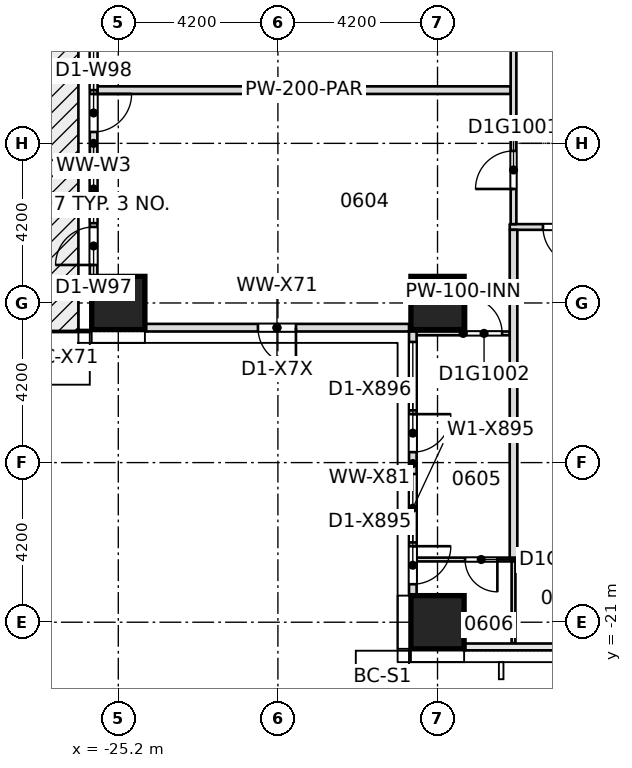
"""IFC4 building model, lengths in metres.
Left out: names, types, materials, properties, quantities, classifications, styles, units other than length and angle.
Written with IfcOpenShell. Run it as: python <this file> out.ifc"""

import sys

from ifc_helpers import new_model, si_unit, direction, frame, frame_2d, origin, origin_2d, place, context, subcontext, project, spatial, rectangle, extrude, element, fill, save


model = new_model("IFC4")
c1 = context("Model", 3, precision=1e-05, world=origin(), true_north=direction((0.0, 1.0)))
c2 = subcontext(c1, "Body", "Model", "MODEL_VIEW")
j1 = project(units=[si_unit("LENGTHUNIT", "METRE"), si_unit("PLANEANGLEUNIT", "RADIAN")], contexts=[c1])
p1 = place(None, origin())
s1 = spatial("IfcSite", under=j1, at=p1, CompositionType="ELEMENT")
p2 = place(p1, origin())
s2 = spatial("IfcBuilding", under=s1, at=p2, CompositionType="ELEMENT")
p3 = place(p2, frame((0.0, 0.0, 34.5)))
s3 = spatial("IfcBuildingStorey", under=s2, at=p3, CompositionType="ELEMENT", Elevation=34.5)
for number, where, z_axis, x_axis in (
    (1, (-16.8, -21.0, -0.32), (0.0, 0.0, 1.0), (1.0, 0.0, 0.0)),
    (2, (-25.2, -12.6, -0.32), (0.0, 0.0, 1.0), (1.0, 0.0, 0.0)),
    (3, (-16.8, -12.6, -0.32), (0.0, 0.0, 1.0), (1.0, 0.0, 0.0)),
):
    element("IfcColumn", number, at=place(p3, frame(where, z_axis=z_axis, x_axis=x_axis)), inside=s3, PredefinedType="COLUMN", context=c2, shape_type="SweptSolid", body=[
        extrude(rectangle(XDim=1.4, YDim=1.4, at=origin_2d()), origin(), (0.0, 0.0, 1.0), 3.45),
    ])
p4 = place(p3, frame((-17.35, -19.35, 0.0), z_axis=(0.0, 0.0, 1.0), x_axis=(1.0, 0.0, 0.0)))
e4 = element("IfcWall", 4, at=p4, inside=s3, PredefinedType="PARTITIONING", context=c2, shape_type="SweptSolid", body=[
    extrude(rectangle(XDim=2.65, YDim=0.1, at=frame_2d((1.325, 0.0))), origin(), (0.0, 0.0, 1.0), 3.13),
])
p5 = place(p4, frame((1.275, 0.0, 0.0)))
e5 = element("IfcOpeningElement", 5, at=p5, cuts=e4, PredefinedType="OPENING", context=c2, shape_type="SweptSolid", body=[
    extrude(rectangle(XDim=0.85, YDim=2.1, at=frame_2d((0.425, 1.05))), frame((0.0, 0.06, 0.0), z_axis=(0.0, -1.0, 0.0), x_axis=(1.0, 0.0, 0.0)), (0.0, 0.0, 1.0), 0.12),
])
p6 = place(p3, frame((-17.35, -13.4, 0.0), z_axis=(0.0, 0.0, 1.0), x_axis=(1.0, 0.0, 0.0)))
e6 = element("IfcWall", 6, at=p6, inside=s3, PredefinedType="PARTITIONING", context=c2, shape_type="SweptSolid", body=[
    extrude(rectangle(XDim=2.45, YDim=0.1, at=frame_2d((1.225, 0.0))), origin(), (0.0, 0.0, 1.0), 3.13),
])
p7 = place(p6, frame((1.3, 0.0, 0.0)))
e7 = element("IfcOpeningElement", 7, at=p7, cuts=e6, PredefinedType="OPENING", context=c2, shape_type="SweptSolid", body=[
    extrude(rectangle(XDim=0.95, YDim=2.1, at=frame_2d((0.475, 1.05))), frame((0.0, 0.06, 0.0), z_axis=(0.0, -1.0, 0.0), x_axis=(1.0, 0.0, 0.0)), (0.0, 0.0, 1.0), 0.12),
])
p8 = place(p3, frame((-14.9, -10.6, 0.0), z_axis=(0.0, 0.0, 1.0), x_axis=(1.0, 0.0, 0.0)))
e8 = element("IfcWall", 8, at=p8, inside=s3, PredefinedType="PARTITIONING", context=c2, shape_type="SweptSolid", body=[
    extrude(rectangle(XDim=29.8, YDim=0.15, at=frame_2d((14.9, 0.0))), origin(), (0.0, 0.0, 1.0), 3.13),
])
p9 = place(p8, frame((9.225, 0.0, 0.0)))
e9 = element("IfcOpeningElement", 9, at=p9, cuts=e8, PredefinedType="OPENING", context=c2, shape_type="SweptSolid", body=[
    extrude(rectangle(XDim=0.95, YDim=2.1, at=frame_2d((0.475, 1.05))), frame((0.0, 0.085, 0.0), z_axis=(0.0, -1.0, 0.0), x_axis=(1.0, 0.0, 0.0)), (0.0, 0.0, 1.0), 0.17),
])
p10 = place(p8, frame((19.625, 0.0, 0.0)))
e10 = element("IfcOpeningElement", 10, at=p10, cuts=e8, PredefinedType="OPENING", context=c2, shape_type="SweptSolid", body=[
    extrude(rectangle(XDim=0.95, YDim=2.1, at=frame_2d((0.475, 1.05))), frame((0.0, 0.085, 0.0), z_axis=(0.0, -1.0, 0.0), x_axis=(1.0, 0.0, 0.0)), (0.0, 0.0, 1.0), 0.17),
])
p11 = place(p8, frame((3.95, 0.0, 0.0)))
e11 = element("IfcOpeningElement", 11, at=p11, cuts=e8, PredefinedType="OPENING", context=c2, shape_type="SweptSolid", body=[
    extrude(rectangle(XDim=1.1, YDim=2.1, at=frame_2d((0.55, 1.05))), frame((0.0, 0.085, 0.0), z_axis=(0.0, -1.0, 0.0), x_axis=(1.0, 0.0, 0.0)), (0.0, 0.0, 1.0), 0.17),
])
p12 = place(p8, frame((15.5, 0.0, 0.0)))
e12 = element("IfcOpeningElement", 12, at=p12, cuts=e8, PredefinedType="OPENING", context=c2, shape_type="SweptSolid", body=[
    extrude(rectangle(XDim=1.1, YDim=2.1, at=frame_2d((0.55, 1.05))), frame((0.0, 0.085, 0.0), z_axis=(0.0, -1.0, 0.0), x_axis=(1.0, 0.0, 0.0)), (0.0, 0.0, 1.0), 0.17),
])
p13 = place(p8, frame((24.75, 0.0, 0.0)))
e13 = element("IfcOpeningElement", 13, at=p13, cuts=e8, PredefinedType="OPENING", context=c2, shape_type="SweptSolid", body=[
    extrude(rectangle(XDim=1.1, YDim=2.1, at=frame_2d((0.55, 1.05))), frame((0.0, 0.085, 0.0), z_axis=(0.0, -1.0, 0.0), x_axis=(1.0, 0.0, 0.0)), (0.0, 0.0, 1.0), 0.17),
])
p14 = place(p8, frame((0.875, 0.0, 0.0)))
e14 = element("IfcOpeningElement", 14, at=p14, cuts=e8, PredefinedType="OPENING", context=c2, shape_type="SweptSolid", body=[
    extrude(rectangle(XDim=1.0, YDim=2.1, at=frame_2d((0.5, 1.05))), frame((0.0, 0.085, 0.0), z_axis=(0.0, -1.0, 0.0), x_axis=(1.0, 0.0, 0.0)), (0.0, 0.0, 1.0), 0.17),
])
p15 = place(p8, frame((27.925, 0.0, 0.0)))
e15 = element("IfcOpeningElement", 15, at=p15, cuts=e8, PredefinedType="OPENING", context=c2, shape_type="SweptSolid", body=[
    extrude(rectangle(XDim=1.0, YDim=2.1, at=frame_2d((0.5, 1.05))), frame((0.0, 0.085, 0.0), z_axis=(0.0, -1.0, 0.0), x_axis=(1.0, 0.0, 0.0)), (0.0, 0.0, 1.0), 0.17),
])
p16 = place(p3, frame((-25.75, -7.0, 0.0), z_axis=(0.0, 0.0, 1.0), x_axis=(1.0, 0.0, 0.0)))
e16 = element("IfcWall", 16, at=p16, inside=s3, PredefinedType="PARTITIONING", context=c2, shape_type="SweptSolid", body=[
    extrude(rectangle(XDim=10.875, YDim=0.2, at=frame_2d((5.438, 0.0))), origin(), (0.0, 0.0, 1.0), 3.13),
])
p17 = place(p3, frame((-14.8, -21.55, 0.0), z_axis=(0.0, 0.0, 1.0), x_axis=(0.0, 1.0, 0.0)))
e17 = element("IfcWall", 17, at=p17, inside=s3, PredefinedType="PARTITIONING", context=c2, shape_type="SweptSolid", body=[
    extrude(rectangle(XDim=2.15, YDim=0.1, at=frame_2d((1.075, 0.0))), origin(), (0.0, 0.0, 1.0), 3.13),
])
p18 = place(p3, frame((-14.8, -19.3, 0.0), z_axis=(0.0, 0.0, 1.0), x_axis=(0.0, 1.0, 0.0)))
e18 = element("IfcWall", 18, at=p18, inside=s3, PredefinedType="PARTITIONING", context=c2, shape_type="SweptSolid", body=[
    extrude(rectangle(XDim=8.625, YDim=0.2, at=frame_2d((4.312, 0.0))), origin(), (0.0, 0.0, 1.0), 3.13),
])
p19 = place(p3, frame((-14.8, -10.525, 0.0), z_axis=(0.0, 0.0, 1.0), x_axis=(0.0, 1.0, 0.0)))
e19 = element("IfcWall", 19, at=p19, inside=s3, PredefinedType="PARTITIONING", context=c2, shape_type="SweptSolid", body=[
    extrude(rectangle(XDim=23.825, YDim=0.15, at=frame_2d((11.913, 0.0))), origin(), (0.0, 0.0, 1.0), 3.13),
])
p20 = place(p19, frame((0.925, 0.0, 0.0)))
e20 = element("IfcOpeningElement", 20, at=p20, cuts=e19, PredefinedType="OPENING", context=c2, shape_type="SweptSolid", body=[
    extrude(rectangle(XDim=1.0, YDim=2.1, at=frame_2d((0.5, 1.05))), frame((0.0, 0.085, 0.0), z_axis=(0.0, -1.0, 0.0), x_axis=(1.0, 0.0, 0.0)), (0.0, 0.0, 1.0), 0.17),
])
p21 = place(p19, frame((16.065, 0.0, 0.0)))
e21 = element("IfcOpeningElement", 21, at=p21, cuts=e19, PredefinedType="OPENING", context=c2, shape_type="SweptSolid", body=[
    extrude(rectangle(XDim=1.0, YDim=2.1, at=frame_2d((0.5, 1.05))), frame((0.0, 0.085, 0.0), z_axis=(0.0, -1.0, 0.0), x_axis=(1.0, 0.0, 0.0)), (0.0, 0.0, 1.0), 0.17),
])
p22 = place(p19, frame((21.065, 0.0, 0.0)))
e22 = element("IfcOpeningElement", 22, at=p22, cuts=e19, PredefinedType="OPENING", context=c2, shape_type="SweptSolid", body=[
    extrude(rectangle(XDim=0.95, YDim=2.1, at=frame_2d((0.475, 1.05))), frame((0.0, 0.085, 0.0), z_axis=(0.0, -1.0, 0.0), x_axis=(1.0, 0.0, 0.0)), (0.0, 0.0, 1.0), 0.17),
])
p23 = place(p19, frame((9.975, 0.0, 0.0)))
e23 = element("IfcOpeningElement", 23, at=p23, cuts=e19, PredefinedType="OPENING", context=c2, shape_type="SweptSolid", body=[
    extrude(rectangle(XDim=1.1, YDim=2.1, at=frame_2d((0.55, 1.05))), frame((0.0, 0.085, 0.0), z_axis=(0.0, -1.0, 0.0), x_axis=(1.0, 0.0, 0.0)), (0.0, 0.0, 1.0), 0.17),
])
p24 = place(p19, frame((4.725, 0.0, 0.0)))
e24 = element("IfcOpeningElement", 24, at=p24, cuts=e19, PredefinedType="OPENING", context=c2, shape_type="SweptSolid", body=[
    extrude(rectangle(XDim=1.0, YDim=2.1, at=frame_2d((0.5, 1.05))), frame((0.0, 0.085, 0.0), z_axis=(0.0, -1.0, 0.0), x_axis=(1.0, 0.0, 0.0)), (0.0, 0.0, 1.0), 0.17),
])
p25 = place(p3, frame((-25.85, -4.9, 0.0), z_axis=(0.0, 0.0, 1.0), x_axis=(0.0, -1.0, 0.0)))
e25 = element("IfcWall", 25, at=p25, inside=s3, PredefinedType="STANDARD", context=c2, shape_type="SweptSolid", body=[
    extrude(rectangle(XDim=7.0, YDim=0.2, at=frame_2d((3.5, 0.0))), origin(), (0.0, 0.0, 1.0), 3.13),
])
p26 = place(p25, frame((3.8, 0.0, 0.2)))
e26 = element("IfcOpeningElement", 26, at=p26, cuts=e25, PredefinedType="OPENING", context=c2, shape_type="SweptSolid", body=[
    extrude(rectangle(XDim=1.8, YDim=2.65, at=frame_2d((0.9, 1.325))), frame((0.0, 0.11, 0.0), z_axis=(0.0, -1.0, 0.0), x_axis=(1.0, 0.0, 0.0)), (0.0, 0.0, 1.0), 0.22),
])
p27 = place(p25, frame((5.7, 0.0, 0.0)))
e27 = element("IfcOpeningElement", 27, at=p27, cuts=e25, PredefinedType="OPENING", context=c2, shape_type="SweptSolid", body=[
    extrude(rectangle(XDim=1.0, YDim=2.4, at=frame_2d((0.5, 1.2))), frame((0.0, 0.11, 0.0), z_axis=(0.0, -1.0, 0.0), x_axis=(1.0, 0.0, 0.0)), (0.0, 0.0, 1.0), 0.22),
])
p28 = place(p25, frame((0.3, 0.0, 0.2)))
e28 = element("IfcOpeningElement", 28, at=p28, cuts=e25, PredefinedType="OPENING", context=c2, shape_type="SweptSolid", body=[
    extrude(rectangle(XDim=1.8, YDim=2.65, at=frame_2d((0.9, 1.325))), frame((0.0, 0.11, 0.0), z_axis=(0.0, -1.0, 0.0), x_axis=(1.0, 0.0, 0.0)), (0.0, 0.0, 1.0), 0.22),
])
p29 = place(p25, frame((2.2, 0.0, 0.0)))
e29 = element("IfcOpeningElement", 29, at=p29, cuts=e25, PredefinedType="OPENING", context=c2, shape_type="SweptSolid", body=[
    extrude(rectangle(XDim=1.0, YDim=2.4, at=frame_2d((0.5, 1.2))), frame((0.0, 0.11, 0.0), z_axis=(0.0, -1.0, 0.0), x_axis=(1.0, 0.0, 0.0)), (0.0, 0.0, 1.0), 0.22),
])
p30 = place(p3, frame((-24.5, -13.25, 0.0), z_axis=(0.0, 0.0, 1.0), x_axis=(1.0, 0.0, 0.0)))
e30 = element("IfcWall", 30, at=p30, inside=s3, PredefinedType="STANDARD", context=c2, shape_type="SweptSolid", body=[
    extrude(rectangle(XDim=6.95, YDim=0.2, at=frame_2d((3.475, 0.0))), origin(), (0.0, 0.0, 1.0), 3.13),
])
p31 = place(p30, frame((2.975, 0.0, 0.0)))
e31 = element("IfcOpeningElement", 31, at=p31, cuts=e30, PredefinedType="OPENING", context=c2, shape_type="SweptSolid", body=[
    extrude(rectangle(XDim=1.0, YDim=2.4, at=frame_2d((0.5, 1.2))), frame((0.0, 0.11, 0.0), z_axis=(0.0, -1.0, 0.0), x_axis=(1.0, 0.0, 0.0)), (0.0, 0.0, 1.0), 0.22),
])
p32 = place(p3, frame((-17.45, -13.35, 0.0), z_axis=(0.0, 0.0, 1.0), x_axis=(0.0, -1.0, 0.0)))
e32 = element("IfcWall", 32, at=p32, inside=s3, PredefinedType="STANDARD", context=c2, shape_type="SweptSolid", body=[
    extrude(rectangle(XDim=6.95, YDim=0.2, at=frame_2d((3.475, 0.0))), origin(), (0.0, 0.0, 1.0), 3.13),
])
p33 = place(p32, frame((3.75, 0.0, 0.2)))
e33 = element("IfcOpeningElement", 33, at=p33, cuts=e32, PredefinedType="OPENING", context=c2, shape_type="SweptSolid", body=[
    extrude(rectangle(XDim=1.8, YDim=2.65, at=frame_2d((0.9, 1.325))), frame((0.0, 0.11, 0.0), z_axis=(0.0, -1.0, 0.0), x_axis=(1.0, 0.0, 0.0)), (0.0, 0.0, 1.0), 0.22),
])
p34 = place(p32, frame((5.65, 0.0, 0.0)))
e34 = element("IfcOpeningElement", 34, at=p34, cuts=e32, PredefinedType="OPENING", context=c2, shape_type="SweptSolid", body=[
    extrude(rectangle(XDim=1.0, YDim=2.4, at=frame_2d((0.5, 1.2))), frame((0.0, 0.11, 0.0), z_axis=(0.0, -1.0, 0.0), x_axis=(1.0, 0.0, 0.0)), (0.0, 0.0, 1.0), 0.22),
])
p35 = place(p32, frame((0.275, 0.0, 0.2)))
e35 = element("IfcOpeningElement", 35, at=p35, cuts=e32, PredefinedType="OPENING", context=c2, shape_type="SweptSolid", body=[
    extrude(rectangle(XDim=1.8, YDim=2.65, at=frame_2d((0.9, 1.325))), frame((0.0, 0.11, 0.0), z_axis=(0.0, -1.0, 0.0), x_axis=(1.0, 0.0, 0.0)), (0.0, 0.0, 1.0), 0.22),
])
p36 = place(p32, frame((2.175, 0.0, 0.0)))
e36 = element("IfcOpeningElement", 36, at=p36, cuts=e32, PredefinedType="OPENING", context=c2, shape_type="SweptSolid", body=[
    extrude(rectangle(XDim=1.0, YDim=2.4, at=frame_2d((0.5, 1.2))), frame((0.0, 0.11, 0.0), z_axis=(0.0, -1.0, 0.0), x_axis=(1.0, 0.0, 0.0)), (0.0, 0.0, 1.0), 0.22),
])
p37 = place(p20, origin())
e37 = element("IfcDoor", 37, at=p37, inside=s3, OperationType="SINGLE_SWING_LEFT", PredefinedType="DOOR", context=c2, shape_type="SweptSolid", body=[
    extrude(rectangle(XDim=1.0, YDim=2.1, at=frame_2d((0.5, 1.05))), frame((0.0, 0.025, 0.0), z_axis=(0.0, -1.0, 0.0), x_axis=(1.0, 0.0, 0.0)), (0.0, 0.0, 1.0), 0.05),
])
fill(e20, e37)
p38 = place(p7, origin())
e38 = element("IfcDoor", 38, at=p38, inside=s3, OperationType="SINGLE_SWING_RIGHT", PredefinedType="DOOR", context=c2, shape_type="SweptSolid", body=[
    extrude(rectangle(XDim=0.95, YDim=2.1, at=frame_2d((0.475, 1.05))), frame((0.0, 0.025, 0.0), z_axis=(0.0, -1.0, 0.0), x_axis=(1.0, 0.0, 0.0)), (0.0, 0.0, 1.0), 0.05),
])
fill(e7, e38)
p39 = place(p5, origin())
e39 = element("IfcDoor", 39, at=p39, inside=s3, OperationType="SINGLE_SWING_RIGHT", PredefinedType="DOOR", context=c2, shape_type="SweptSolid", body=[
    extrude(rectangle(XDim=0.85, YDim=2.1, at=frame_2d((0.425, 1.05))), frame((0.0, 0.025, 0.0), z_axis=(0.0, -1.0, 0.0), x_axis=(1.0, 0.0, 0.0)), (0.0, 0.0, 1.0), 0.05),
])
fill(e5, e39)
p40 = place(p14, origin())
e40 = element("IfcDoor", 40, at=p40, inside=s3, OperationType="SINGLE_SWING_RIGHT", PredefinedType="DOOR", context=c2, shape_type="SweptSolid", body=[
    extrude(rectangle(XDim=1.0, YDim=2.1, at=frame_2d((0.5, 1.05))), frame((0.0, 0.025, 0.0), z_axis=(0.0, -1.0, 0.0), x_axis=(1.0, 0.0, 0.0)), (0.0, 0.0, 1.0), 0.05),
])
fill(e14, e40)
p41 = place(p26, origin())
e41 = element("IfcWindow", 41, at=p41, inside=s3, PartitioningType="SINGLE_PANEL", PredefinedType="WINDOW", context=c2, shape_type="SweptSolid", body=[
    extrude(rectangle(XDim=1.8, YDim=2.65, at=frame_2d((0.9, 1.325))), frame((0.0, 0.03, 0.0), z_axis=(0.0, -1.0, 0.0), x_axis=(1.0, 0.0, 0.0)), (0.0, 0.0, 1.0), 0.06),
])
fill(e26, e41)
p42 = place(p27, origin())
e42 = element("IfcDoor", 42, at=p42, inside=s3, OperationType="SINGLE_SWING_LEFT", PredefinedType="DOOR", context=c2, shape_type="SweptSolid", body=[
    extrude(rectangle(XDim=1.0, YDim=2.4, at=frame_2d((0.5, 1.2))), frame((0.0, 0.025, 0.0), z_axis=(0.0, -1.0, 0.0), x_axis=(1.0, 0.0, 0.0)), (0.0, 0.0, 1.0), 0.05),
])
fill(e27, e42)
p43 = place(p28, origin())
e43 = element("IfcWindow", 43, at=p43, inside=s3, PartitioningType="SINGLE_PANEL", PredefinedType="WINDOW", context=c2, shape_type="SweptSolid", body=[
    extrude(rectangle(XDim=1.8, YDim=2.65, at=frame_2d((0.9, 1.325))), frame((0.0, 0.03, 0.0), z_axis=(0.0, -1.0, 0.0), x_axis=(1.0, 0.0, 0.0)), (0.0, 0.0, 1.0), 0.06),
])
fill(e28, e43)
p44 = place(p29, origin())
e44 = element("IfcDoor", 44, at=p44, inside=s3, OperationType="SINGLE_SWING_LEFT", PredefinedType="DOOR", context=c2, shape_type="SweptSolid", body=[
    extrude(rectangle(XDim=1.0, YDim=2.4, at=frame_2d((0.5, 1.2))), frame((0.0, 0.025, 0.0), z_axis=(0.0, -1.0, 0.0), x_axis=(1.0, 0.0, 0.0)), (0.0, 0.0, 1.0), 0.05),
])
fill(e29, e44)
p45 = place(p31, origin())
e45 = element("IfcDoor", 45, at=p45, inside=s3, OperationType="SINGLE_SWING_LEFT", PredefinedType="DOOR", context=c2, shape_type="SweptSolid", body=[
    extrude(rectangle(XDim=1.0, YDim=2.4, at=frame_2d((0.5, 1.2))), frame((0.0, 0.025, 0.0), z_axis=(0.0, -1.0, 0.0), x_axis=(1.0, 0.0, 0.0)), (0.0, 0.0, 1.0), 0.05),
])
fill(e31, e45)
p46 = place(p33, origin())
e46 = element("IfcWindow", 46, at=p46, inside=s3, PartitioningType="SINGLE_PANEL", PredefinedType="WINDOW", context=c2, shape_type="SweptSolid", body=[
    extrude(rectangle(XDim=1.8, YDim=2.65, at=frame_2d((0.9, 1.325))), frame((0.0, 0.03, 0.0), z_axis=(0.0, -1.0, 0.0), x_axis=(1.0, 0.0, 0.0)), (0.0, 0.0, 1.0), 0.06),
])
fill(e33, e46)
p47 = place(p34, origin())
e47 = element("IfcDoor", 47, at=p47, inside=s3, OperationType="SINGLE_SWING_LEFT", PredefinedType="DOOR", context=c2, shape_type="SweptSolid", body=[
    extrude(rectangle(XDim=1.0, YDim=2.4, at=frame_2d((0.5, 1.2))), frame((0.0, 0.025, 0.0), z_axis=(0.0, -1.0, 0.0), x_axis=(1.0, 0.0, 0.0)), (0.0, 0.0, 1.0), 0.05),
])
fill(e34, e47)
p48 = place(p35, origin())
e48 = element("IfcWindow", 48, at=p48, inside=s3, PartitioningType="SINGLE_PANEL", PredefinedType="WINDOW", context=c2, shape_type="SweptSolid", body=[
    extrude(rectangle(XDim=1.8, YDim=2.65, at=frame_2d((0.9, 1.325))), frame((0.0, 0.03, 0.0), z_axis=(0.0, -1.0, 0.0), x_axis=(1.0, 0.0, 0.0)), (0.0, 0.0, 1.0), 0.06),
])
fill(e35, e48)
p49 = place(p36, origin())
e49 = element("IfcDoor", 49, at=p49, inside=s3, OperationType="SINGLE_SWING_LEFT", PredefinedType="DOOR", context=c2, shape_type="SweptSolid", body=[
    extrude(rectangle(XDim=1.0, YDim=2.4, at=frame_2d((0.5, 1.2))), frame((0.0, 0.025, 0.0), z_axis=(0.0, -1.0, 0.0), x_axis=(1.0, 0.0, 0.0)), (0.0, 0.0, 1.0), 0.05),
])
fill(e36, e49)
save(model, sys.argv[1])
